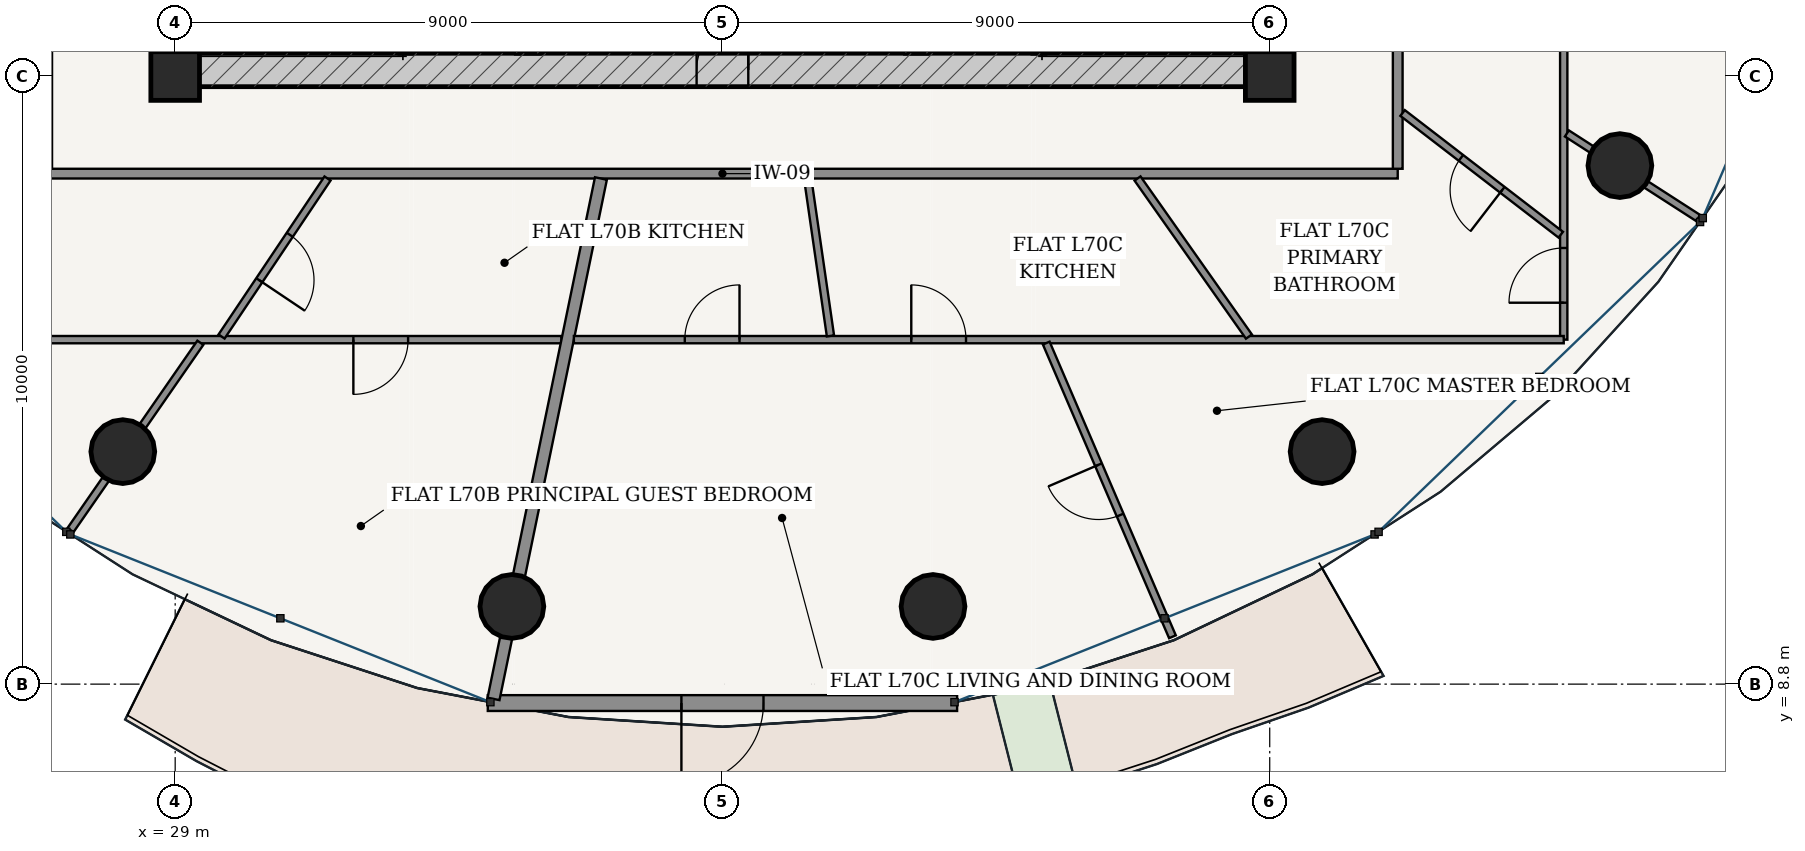
"""IFC4 building model, lengths in metres.
Left out: names, types, materials, properties, quantities, classifications, styles, units other than length and angle.
Written with IfcOpenShell. Run it as: python <this file> out.ifc"""

import sys

from ifc_helpers import new_model, si_unit, direction, frame, frame_2d, origin, origin_2d, place, context, subcontext, project, spatial, rectangle, hollow_circle, extrude, source, transform, mapped, element, fill, save


model = new_model("IFC4")
c1 = context("Model", 3, precision=1e-05, world=origin(), true_north=direction((-0.2419218956, 0.970295726276)))
c2 = subcontext(c1, "Body", "Model", "MODEL_VIEW")
j1 = project(units=[si_unit("LENGTHUNIT", "METRE"), si_unit("PLANEANGLEUNIT", "RADIAN")], contexts=[c1])
p1 = place(None, origin())
s1 = spatial("IfcSite", under=j1, at=p1, CompositionType="ELEMENT")
p2 = place(p1, origin())
s2 = spatial("IfcBuilding", under=s1, at=p2, CompositionType="ELEMENT")
p3 = place(p2, frame((0.0, 0.0, 266.95)))
s3 = spatial("IfcBuildingStorey", under=s2, at=p3, CompositionType="ELEMENT", Elevation=266.95)
for number, where, z_axis, x_axis in (
    (1, (29.0, 18.8, 0.0), (0.0, 0.0, 1.0), (1.0, 0.0, 0.0)),
    (2, (47.0, 18.8, 0.0), (0.0, 0.0, 1.0), (1.0, 0.0, 0.0)),
):
    element("IfcColumn", number, at=place(p3, frame(where, z_axis=z_axis, x_axis=x_axis)), inside=s3, PredefinedType="COLUMN", context=c2, shape_type="SweptSolid", body=[
        extrude(rectangle(XDim=0.8, YDim=0.8, at=origin_2d()), origin(), (0.0, 0.0, 1.0), 3.75),
    ])
p4 = place(p3, frame((28.825, 18.9, 0.0), z_axis=(0.0, 0.0, 1.0), x_axis=(1.0, 0.0, 0.0)))
e3 = element("IfcWall", 3, at=p4, inside=s3, PredefinedType="SHEAR", context=c2, shape_type="SweptSolid", body=[
    extrude(rectangle(XDim=18.35, YDim=0.55, at=frame_2d((9.175, 0.0))), origin(), (0.0, 0.0, 1.0), 3.49),
])
p5 = place(p4, frame((8.75, 0.0, 0.0)))
e4 = element("IfcOpeningElement", 4, at=p5, cuts=e3, PredefinedType="OPENING", context=c2, shape_type="SweptSolid", body=[
    extrude(rectangle(XDim=0.85, YDim=2.1, at=frame_2d((0.425, 1.05))), frame((0.0, 0.285, 0.0), z_axis=(0.0, -1.0, 0.0), x_axis=(1.0, 0.0, 0.0)), (0.0, 0.0, 1.0), 0.57),
])
p6 = place(p3, frame((29.1, 19.175, 0.0), z_axis=(0.0, 0.0, 1.0), x_axis=(0.0, 1.0, 0.0)))
e5 = element("IfcWall", 5, at=p6, inside=s3, PredefinedType="SHEAR", context=c2, shape_type="SweptSolid", body=[
    extrude(rectangle(XDim=15.25, YDim=0.55, at=frame_2d((7.625, 0.0))), origin(), (0.0, 0.0, 1.0), 3.49),
])
p7 = place(p6, frame((9.875, 0.0, 0.0)))
e6 = element("IfcOpeningElement", 6, at=p7, cuts=e5, PredefinedType="OPENING", context=c2, shape_type="SweptSolid", body=[
    extrude(rectangle(XDim=1.5, YDim=2.2, at=frame_2d((0.75, 1.1))), frame((0.0, 0.285, 0.0), z_axis=(0.0, -1.0, 0.0), x_axis=(1.0, 0.0, 0.0)), (0.0, 0.0, 1.0), 0.57),
])
p8 = place(p3, frame((46.9, 19.175, 0.0), z_axis=(0.0, 0.0, 1.0), x_axis=(0.0, 1.0, 0.0)))
e7 = element("IfcWall", 7, at=p8, inside=s3, PredefinedType="SHEAR", context=c2, shape_type="SweptSolid", body=[
    extrude(rectangle(XDim=15.25, YDim=0.55, at=frame_2d((7.625, 0.0))), origin(), (0.0, 0.0, 1.0), 3.49),
])
p9 = place(p8, frame((9.875, 0.0, 0.0)))
e8 = element("IfcOpeningElement", 8, at=p9, cuts=e7, PredefinedType="OPENING", context=c2, shape_type="SweptSolid", body=[
    extrude(rectangle(XDim=1.5, YDim=2.2, at=frame_2d((0.75, 1.1))), frame((0.0, 0.285, 0.0), z_axis=(0.0, -1.0, 0.0), x_axis=(1.0, 0.0, 0.0)), (0.0, 0.0, 1.0), 0.57),
])
for number, where, z_axis, x_axis in (
    (9, (32.795, 19.175, 0.0), (0.0, 0.0, 1.0), (0.0, 1.0, 0.0)),
    (10, (43.205, 19.175, 0.0), (0.0, 0.0, 1.0), (0.0, 1.0, 0.0)),
):
    element("IfcWall", number, at=place(p3, frame(where, z_axis=z_axis, x_axis=x_axis)), inside=s3, PredefinedType="SOLIDWALL", context=c2, shape_type="SweptSolid", body=[
        extrude(rectangle(XDim=7.375, YDim=0.2, at=frame_2d((3.688, 0.0))), origin(), (0.0, 0.0, 1.0), 3.49),
    ])
p10 = place(p3, frame((34.8, 19.175, 0.0), z_axis=(0.0, 0.0, 1.0), x_axis=(0.0, 1.0, 0.0)))
e11 = element("IfcWall", 11, at=p10, inside=s3, PredefinedType="SHEAR", context=c2, shape_type="SweptSolid", body=[
    extrude(rectangle(XDim=15.25, YDim=0.38, at=frame_2d((7.625, 0.0))), origin(), (0.0, 0.0, 1.0), 3.49),
])
p11 = place(p10, frame((7.8, 0.0, 0.0)))
e12 = element("IfcOpeningElement", 12, at=p11, cuts=e11, PredefinedType="OPENING", context=c2, shape_type="SweptSolid", body=[
    extrude(rectangle(XDim=1.05, YDim=2.15, at=frame_2d((0.525, 1.075))), frame((0.0, 0.2, 0.0), z_axis=(0.0, -1.0, 0.0), x_axis=(1.0, 0.0, 0.0)), (0.0, 0.0, 1.0), 0.4),
])
p12 = place(p3, frame((41.2, 19.175, 0.0), z_axis=(0.0, 0.0, 1.0), x_axis=(0.0, 1.0, 0.0)))
e13 = element("IfcWall", 13, at=p12, inside=s3, PredefinedType="SHEAR", context=c2, shape_type="SweptSolid", body=[
    extrude(rectangle(XDim=15.25, YDim=0.38, at=frame_2d((7.625, 0.0))), origin(), (0.0, 0.0, 1.0), 3.49),
])
p13 = place(p12, frame((7.8, 0.0, 0.0)))
e14 = element("IfcOpeningElement", 14, at=p13, cuts=e13, PredefinedType="OPENING", context=c2, shape_type="SweptSolid", body=[
    extrude(rectangle(XDim=1.05, YDim=2.15, at=frame_2d((0.525, 1.075))), frame((0.0, 0.2, 0.0), z_axis=(0.0, -1.0, 0.0), x_axis=(1.0, 0.0, 0.0)), (0.0, 0.0, 1.0), 0.4),
])
for number, where, z_axis, x_axis in (
    (15, (28.139, 12.624, 0.0), (0.0, 0.0, 1.0), (1.0, 0.0, 0.0)),
    (16, (34.537, 10.078, 0.0), (0.0, 0.0, 1.0), (1.0, 0.0, 0.0)),
    (17, (41.463, 10.078, 0.0), (0.0, 0.0, 1.0), (1.0, 0.0, 0.0)),
    (18, (47.861, 12.624, 0.0), (0.0, 0.0, 1.0), (1.0, 0.0, 0.0)),
    (19, (52.759, 17.328, 0.0), (0.0, 0.0, 1.0), (1.0, 0.0, 0.0)),
):
    element("IfcColumn", number, at=place(p3, frame(where, z_axis=z_axis, x_axis=x_axis)), inside=s3, PredefinedType="COLUMN", context=c2, shape_type="SweptSolid", body=[
        extrude(hollow_circle(Radius=0.525, WallThickness=0.035, at=origin_2d()), origin(), (0.0, 0.0, 1.0), 3.75),
    ])
p14 = place(p3, frame((34.141, 8.489, 0.0), z_axis=(0.0, 0.0, 1.0), x_axis=(1.0, 0.0, 0.0)))
e20 = element("IfcWall", 20, at=p14, inside=s3, PredefinedType="SOLIDWALL", context=c2, shape_type="SweptSolid", body=[
    extrude(rectangle(XDim=7.718, YDim=0.26, at=frame_2d((3.859, 0.0))), origin(), (0.0, 0.0, 1.0), 3.49),
])
p15 = place(p14, frame((3.184, 0.0, 0.0)))
e21 = element("IfcOpeningElement", 21, at=p15, cuts=e20, PredefinedType="OPENING", context=c2, shape_type="SweptSolid", body=[
    extrude(rectangle(XDim=1.35, YDim=2.2, at=frame_2d((0.675, 1.1))), frame((0.0, 0.14, 0.0), z_axis=(0.0, -1.0, 0.0), x_axis=(1.0, 0.0, 0.0)), (0.0, 0.0, 1.0), 0.28),
])
p16 = place(p3, frame((26.895, 17.195, 0.0), z_axis=(0.0, 0.0, 1.0), x_axis=(1.0, 0.0, 0.0)))
e22 = element("IfcWall", 22, at=p16, inside=s3, PredefinedType="PARTITIONING", context=c2, shape_type="SweptSolid", body=[
    extrude(rectangle(XDim=22.21, YDim=0.16, at=frame_2d((11.105, 0.0))), origin(), (0.0, 0.0, 1.0), 3.015),
])
p17 = place(p3, frame((26.895, 17.275, 0.0), z_axis=(0.0, 0.0, 1.0), x_axis=(0.0, 1.0, 0.0)))
e23 = element("IfcWall", 23, at=p17, inside=s3, PredefinedType="PARTITIONING", context=c2, shape_type="SweptSolid", body=[
    extrude(rectangle(XDim=13.925, YDim=0.16, at=frame_2d((6.962, 0.0))), origin(), (0.0, 0.0, 1.0), 3.015),
])
p18 = place(p17, frame((1.992, 0.0, 0.0)))
e24 = element("IfcOpeningElement", 24, at=p18, cuts=e23, PredefinedType="OPENING", context=c2, shape_type="SweptSolid", body=[
    extrude(rectangle(XDim=0.98, YDim=2.2, at=frame_2d((0.49, 1.1))), frame((0.0, 0.09, 0.0), z_axis=(0.0, -1.0, 0.0), x_axis=(1.0, 0.0, 0.0)), (0.0, 0.0, 1.0), 0.18),
])
p19 = place(p3, frame((49.105, 17.275, 0.0), z_axis=(0.0, 0.0, 1.0), x_axis=(0.0, 1.0, 0.0)))
e25 = element("IfcWall", 25, at=p19, inside=s3, PredefinedType="PARTITIONING", context=c2, shape_type="SweptSolid", body=[
    extrude(rectangle(XDim=13.925, YDim=0.16, at=frame_2d((6.962, 0.0))), origin(), (0.0, 0.0, 1.0), 3.015),
])
p20 = place(p19, frame((3.647, 0.0, 0.0)))
e26 = element("IfcOpeningElement", 26, at=p20, cuts=e25, PredefinedType="OPENING", context=c2, shape_type="SweptSolid", body=[
    extrude(rectangle(XDim=0.98, YDim=2.2, at=frame_2d((0.49, 1.1))), frame((0.0, 0.09, 0.0), z_axis=(0.0, -1.0, 0.0), x_axis=(1.0, 0.0, 0.0)), (0.0, 0.0, 1.0), 0.18),
])
p21 = place(p3, frame((35.353, 14.465, 0.0), z_axis=(0.0, 0.0, 1.0), x_axis=(-1.0, 0.0, 0.0)))
e27 = element("IfcWall", 27, at=p21, inside=s3, PredefinedType="PARTITIONING", context=c2, shape_type="SweptSolid", body=[
    extrude(rectangle(XDim=11.188, YDim=0.12, at=frame_2d((5.594, 0.0))), origin(), (0.0, 0.0, 1.0), 3.015),
])
p22 = place(p21, frame((2.522, 0.0, 0.0)))
e28 = element("IfcOpeningElement", 28, at=p22, cuts=e27, PredefinedType="OPENING", context=c2, shape_type="SweptSolid", body=[
    extrude(rectangle(XDim=0.9, YDim=2.15, at=frame_2d((0.45, 1.075))), frame((0.0, 0.07, 0.0), z_axis=(0.0, -1.0, 0.0), x_axis=(1.0, 0.0, 0.0)), (0.0, 0.0, 1.0), 0.14),
])
p23 = place(p3, frame((29.414, 14.414, 0.0), z_axis=(0.0, 0.0, 1.0), x_axis=(-0.569657021681, -0.821882520589, 0.0)))
e29 = element("IfcWall", 29, at=p23, inside=s3, PredefinedType="PARTITIONING", context=c2, shape_type="SweptSolid", body=[
    extrude(rectangle(XDim=3.748, YDim=0.12, at=frame_2d((1.874, 0.0))), origin(), (0.0, 0.0, 1.0), 3.015),
])
p24 = place(p3, frame((31.505, 17.115, 0.0), z_axis=(0.0, 0.0, 1.0), x_axis=(-0.557003057019, -0.83051044212, 0.0)))
e30 = element("IfcWall", 30, at=p24, inside=s3, PredefinedType="PARTITIONING", context=c2, shape_type="SweptSolid", body=[
    extrude(rectangle(XDim=3.129, YDim=0.12, at=frame_2d((1.564, 0.0))), origin(), (0.0, 0.0, 1.0), 3.209),
])
p25 = place(p24, frame((1.114, 0.0, 0.0)))
e31 = element("IfcOpeningElement", 31, at=p25, cuts=e30, PredefinedType="OPENING", context=c2, shape_type="SweptSolid", body=[
    extrude(rectangle(XDim=0.9, YDim=2.15, at=frame_2d((0.45, 1.075))), frame((0.0, 0.07, 0.0), z_axis=(0.0, -1.0, 0.0), x_axis=(1.0, 0.0, 0.0)), (0.0, 0.0, 1.0), 0.14),
])
p26 = place(p3, frame((36.001, 17.115, 0.0), z_axis=(0.0, 0.0, 1.0), x_axis=(-0.202108543081, -0.979363128167, 0.0)))
e32 = element("IfcWall", 32, at=p26, inside=s3, PredefinedType="PARTITIONING", context=c2, shape_type="SweptSolid", body=[
    extrude(rectangle(XDim=8.739, YDim=0.2, at=frame_2d((4.369, 0.0))), origin(), (0.0, 0.0, 1.0), 3.015),
])
p27 = place(p3, frame((51.835, 24.045, 0.0), z_axis=(0.0, 0.0, 1.0), x_axis=(0.0, -1.0, 0.0)))
e33 = element("IfcWall", 33, at=p27, inside=s3, PredefinedType="PARTITIONING", context=c2, shape_type="SweptSolid", body=[
    extrude(rectangle(XDim=9.58, YDim=0.12, at=frame_2d((4.79, 0.0))), origin(), (0.0, 0.0, 1.0), 3.015),
])
p28 = place(p27, frame((2.771, 0.0, 0.0)))
e34 = element("IfcOpeningElement", 34, at=p28, cuts=e33, PredefinedType="OPENING", context=c2, shape_type="SweptSolid", body=[
    extrude(rectangle(XDim=0.9, YDim=2.15, at=frame_2d((0.45, 1.075))), frame((0.0, 0.07, 0.0), z_axis=(0.0, -1.0, 0.0), x_axis=(1.0, 0.0, 0.0)), (0.0, 0.0, 1.0), 0.14),
])
p29 = place(p27, frame((8.073, 0.0, 0.0)))
e35 = element("IfcOpeningElement", 35, at=p29, cuts=e33, PredefinedType="OPENING", context=c2, shape_type="SweptSolid", body=[
    extrude(rectangle(XDim=0.9, YDim=2.15, at=frame_2d((0.45, 1.075))), frame((0.0, 0.07, 0.0), z_axis=(0.0, -1.0, 0.0), x_axis=(1.0, 0.0, 0.0)), (0.0, 0.0, 1.0), 0.14),
])
p30 = place(p3, frame((51.835, 14.465, 0.0), z_axis=(0.0, 0.0, 1.0), x_axis=(-1.0, 0.0, 0.0)))
e36 = element("IfcWall", 36, at=p30, inside=s3, PredefinedType="PARTITIONING", context=c2, shape_type="SweptSolid", body=[
    extrude(rectangle(XDim=16.278, YDim=0.12, at=frame_2d((8.139, 0.0))), origin(), (0.0, 0.0, 1.0), 3.015),
])
p31 = place(p30, frame((9.83, 0.0, 0.0)))
e37 = element("IfcOpeningElement", 37, at=p31, cuts=e36, PredefinedType="OPENING", context=c2, shape_type="SweptSolid", body=[
    extrude(rectangle(XDim=0.9, YDim=2.15, at=frame_2d((0.45, 1.075))), frame((0.0, 0.07, 0.0), z_axis=(0.0, -1.0, 0.0), x_axis=(1.0, 0.0, 0.0)), (0.0, 0.0, 1.0), 0.14),
])
p32 = place(p30, frame((13.554, 0.0, 0.0)))
e38 = element("IfcOpeningElement", 38, at=p32, cuts=e36, PredefinedType="OPENING", context=c2, shape_type="SweptSolid", body=[
    extrude(rectangle(XDim=0.9, YDim=2.15, at=frame_2d((0.45, 1.075))), frame((0.0, 0.07, 0.0), z_axis=(0.0, -1.0, 0.0), x_axis=(1.0, 0.0, 0.0)), (0.0, 0.0, 1.0), 0.14),
])
p33 = place(p3, frame((43.325, 14.408, 0.0), z_axis=(0.0, 0.0, 1.0), x_axis=(0.394816056217, -0.918760187292, 0.0)))
e39 = element("IfcWall", 39, at=p33, inside=s3, PredefinedType="PARTITIONING", context=c2, shape_type="SweptSolid", body=[
    extrude(rectangle(XDim=5.256, YDim=0.12, at=frame_2d((2.628, 0.0))), origin(), (0.0, 0.0, 1.0), 3.121),
])
p34 = place(p33, frame((2.178, 0.0, 0.0)))
e40 = element("IfcOpeningElement", 40, at=p34, cuts=e39, PredefinedType="OPENING", context=c2, shape_type="SweptSolid", body=[
    extrude(rectangle(XDim=0.9, YDim=2.15, at=frame_2d((0.45, 1.075))), frame((0.0, 0.07, 0.0), z_axis=(0.0, -1.0, 0.0), x_axis=(1.0, 0.0, 0.0)), (0.0, 0.0, 1.0), 0.14),
])
p35 = place(p3, frame((51.887, 17.856, 0.0), z_axis=(0.0, 0.0, 1.0), x_axis=(0.840708587197, -0.54148783127, 0.0)))
e41 = element("IfcWall", 41, at=p35, inside=s3, PredefinedType="PARTITIONING", context=c2, shape_type="SweptSolid", body=[
    extrude(rectangle(XDim=2.568, YDim=0.12, at=frame_2d((1.284, 0.0))), origin(), (0.0, 0.0, 1.0), 3.015),
])
p36 = place(p3, frame((39.402, 17.115, 0.0), z_axis=(0.0, 0.0, 1.0), x_axis=(0.143185278857, -0.989695900728, 0.0)))
e42 = element("IfcWall", 42, at=p36, inside=s3, PredefinedType="PARTITIONING", context=c2, shape_type="SweptSolid", body=[
    extrude(rectangle(XDim=2.615, YDim=0.12, at=frame_2d((1.308, 0.0))), origin(), (0.0, 0.0, 1.0), 3.49),
])
p37 = place(p3, frame((44.826, 17.115, 0.0), z_axis=(0.0, 0.0, 1.0), x_axis=(0.57609227969, -0.817384661761, 0.0)))
e43 = element("IfcWall", 43, at=p37, inside=s3, PredefinedType="PARTITIONING", context=c2, shape_type="SweptSolid", body=[
    extrude(rectangle(XDim=3.18, YDim=0.12, at=frame_2d((1.59, 0.0))), origin(), (0.0, 0.0, 1.0), 3.209),
])
p38 = place(p3, frame((49.185, 18.192, 0.0), z_axis=(0.0, 0.0, 1.0), x_axis=(0.792502290575, -0.609868936275, 0.0)))
e44 = element("IfcWall", 44, at=p38, inside=s3, PredefinedType="PARTITIONING", context=c2, shape_type="SweptSolid", body=[
    extrude(rectangle(XDim=3.282, YDim=0.12, at=frame_2d((1.641, 0.0))), origin(), (0.0, 0.0, 1.0), 3.121),
])
p39 = place(p38, frame((1.211, 0.0, 0.0)))
e45 = element("IfcOpeningElement", 45, at=p39, cuts=e44, PredefinedType="OPENING", context=c2, shape_type="SweptSolid", body=[
    extrude(rectangle(XDim=0.86, YDim=2.15, at=frame_2d((0.43, 1.075))), frame((0.0, 0.07, 0.0), z_axis=(0.0, -1.0, 0.0), x_axis=(1.0, 0.0, 0.0)), (0.0, 0.0, 1.0), 0.14),
])
m1 = source(origin(), c2, "Body", "SweptSolid", [
    extrude(rectangle(XDim=1.35, YDim=2.2, at=frame_2d((0.675, 1.1))), frame((0.0, 0.025, 0.0), z_axis=(0.0, -1.0, 0.0), x_axis=(1.0, 0.0, 0.0)), (0.0, 0.0, 1.0), 0.05),
])
p40 = place(p15, frame((1.35, 0.0, 0.0), z_axis=(0.0, 0.0, 1.0), x_axis=(-1.0, 0.0, 0.0)))
e46 = element("IfcDoor", 46, at=p40, inside=s3, OperationType="SINGLE_SWING_RIGHT", PredefinedType="DOOR", context=c2, shape_type="MappedRepresentation", body=[
    mapped(m1, transform((0.0, 0.0, 0.0), scale=1.0)),
])
fill(e21, e46)
m2 = source(origin(), c2, "Body", "SweptSolid", [
    extrude(rectangle(XDim=0.85, YDim=2.1, at=frame_2d((0.425, 1.05))), frame((0.0, 0.025, 0.0), z_axis=(0.0, -1.0, 0.0), x_axis=(1.0, 0.0, 0.0)), (0.0, 0.0, 1.0), 0.05),
])
p41 = place(p5, origin())
e47 = element("IfcDoor", 47, at=p41, inside=s3, OperationType="SINGLE_SWING_RIGHT", PredefinedType="DOOR", context=c2, shape_type="MappedRepresentation", body=[
    mapped(m2, transform((0.0, 0.0, 0.0), scale=1.0)),
])
fill(e4, e47)
m3 = source(origin(), c2, "Body", "SweptSolid", [
    extrude(rectangle(XDim=0.9, YDim=2.15, at=frame_2d((0.45, 1.075))), frame((0.0, 0.025, 0.0), z_axis=(0.0, -1.0, 0.0), x_axis=(1.0, 0.0, 0.0)), (0.0, 0.0, 1.0), 0.05),
])
p42 = place(p25, origin())
e48 = element("IfcDoor", 48, at=p42, inside=s3, OperationType="SINGLE_SWING_RIGHT", PredefinedType="DOOR", context=c2, shape_type="MappedRepresentation", body=[
    mapped(m3, transform((0.0, 0.0, 0.0), scale=1.0)),
])
fill(e31, e48)
p43 = place(p22, origin())
e49 = element("IfcDoor", 49, at=p43, inside=s3, OperationType="SINGLE_SWING_RIGHT", PredefinedType="DOOR", context=c2, shape_type="MappedRepresentation", body=[
    mapped(m3, transform((0.0, 0.0, 0.0), scale=1.0)),
])
fill(e28, e49)
m4 = source(origin(), c2, "Body", "SweptSolid", [
    extrude(rectangle(XDim=0.86, YDim=2.15, at=frame_2d((0.43, 1.075))), frame((0.0, 0.025, 0.0), z_axis=(0.0, -1.0, 0.0), x_axis=(1.0, 0.0, 0.0)), (0.0, 0.0, 1.0), 0.05),
])
p44 = place(p39, frame((0.86, 0.0, 0.0), z_axis=(0.0, 0.0, 1.0), x_axis=(-1.0, 0.0, 0.0)))
e50 = element("IfcDoor", 50, at=p44, inside=s3, OperationType="SINGLE_SWING_LEFT", PredefinedType="DOOR", context=c2, shape_type="MappedRepresentation", body=[
    mapped(m4, transform((0.0, 0.0, 0.0), scale=1.0)),
])
fill(e45, e50)
p45 = place(p29, frame((0.9, 0.0, 0.0), z_axis=(0.0, 0.0, 1.0), x_axis=(-1.0, 0.0, 0.0)))
e51 = element("IfcDoor", 51, at=p45, inside=s3, OperationType="SINGLE_SWING_LEFT", PredefinedType="DOOR", context=c2, shape_type="MappedRepresentation", body=[
    mapped(m3, transform((0.0, 0.0, 0.0), scale=1.0)),
])
fill(e35, e51)
p46 = place(p34, frame((0.9, 0.0, 0.0), z_axis=(0.0, 0.0, 1.0), x_axis=(-1.0, 0.0, 0.0)))
e52 = element("IfcDoor", 52, at=p46, inside=s3, OperationType="SINGLE_SWING_RIGHT", PredefinedType="DOOR", context=c2, shape_type="MappedRepresentation", body=[
    mapped(m3, transform((0.0, 0.0, 0.0), scale=1.0)),
])
fill(e40, e52)
p47 = place(p31, frame((0.9, 0.0, 0.0), z_axis=(0.0, 0.0, 1.0), x_axis=(-1.0, 0.0, 0.0)))
e53 = element("IfcDoor", 53, at=p47, inside=s3, OperationType="SINGLE_SWING_LEFT", PredefinedType="DOOR", context=c2, shape_type="MappedRepresentation", body=[
    mapped(m3, transform((0.0, 0.0, 0.0), scale=1.0)),
])
fill(e37, e53)
p48 = place(p32, frame((0.9, 0.0, 0.0), z_axis=(0.0, 0.0, 1.0), x_axis=(-1.0, 0.0, 0.0)))
e54 = element("IfcDoor", 54, at=p48, inside=s3, OperationType="SINGLE_SWING_RIGHT", PredefinedType="DOOR", context=c2, shape_type="MappedRepresentation", body=[
    mapped(m3, transform((0.0, 0.0, 0.0), scale=1.0)),
])
fill(e38, e54)
save(model, sys.argv[1])
